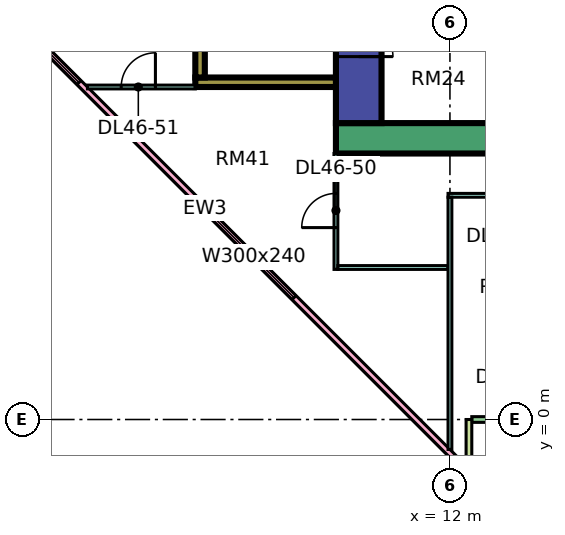
"""IFC4 building model, lengths in metres.
Left out: names, types, materials, properties, quantities, classifications, styles, units other than length and angle.
Written with IfcOpenShell. Run it as: python <this file> out.ifc"""

import sys

from ifc_helpers import new_model, si_unit, direction, frame, frame_2d, origin, place, context, subcontext, project, spatial, rectangle, extrude, element, fill, save


model = new_model("IFC4")
c1 = context("Model", 3, precision=1e-05, world=origin(), true_north=direction((0.0, 1.0)))
c2 = subcontext(c1, "Body", "Model", "MODEL_VIEW")
j1 = project(units=[si_unit("LENGTHUNIT", "METRE"), si_unit("PLANEANGLEUNIT", "RADIAN")], contexts=[c1])
p1 = place(None, origin())
s1 = spatial("IfcSite", under=j1, at=p1, CompositionType="ELEMENT")
p2 = place(p1, origin())
s2 = spatial("IfcBuilding", under=s1, at=p2, CompositionType="ELEMENT")
p3 = place(p2, frame((0.0, 0.0, 198.65)))
s3 = spatial("IfcBuildingStorey", under=s2, at=p3, CompositionType="ELEMENT", Elevation=198.65)
p4 = place(p3, frame((9.0, 7.4, 0.0), z_axis=(0.0, 0.0, 1.0), x_axis=(1.0, 0.0, 0.0)))
e1 = element("IfcWall", 1, at=p4, inside=s3, PredefinedType="SHEAR", context=c2, shape_type="SweptSolid", body=[
    extrude(rectangle(XDim=25.0, YDim=0.8, at=frame_2d((12.5, 0.0))), origin(), (0.0, 0.0, 1.0), 3.75),
])
p5 = place(p3, frame((9.6, 7.8, 0.0), z_axis=(0.0, 0.0, 1.0), x_axis=(0.0, 1.0, 0.0)))
e2 = element("IfcWall", 2, at=p5, inside=s3, PredefinedType="SHEAR", context=c2, shape_type="SweptSolid", body=[
    extrude(rectangle(XDim=11.4, YDim=1.2, at=frame_2d((5.7, 0.0))), origin(), (0.0, 0.0, 1.0), 3.75),
])
p6 = place(p5, frame((4.075, 0.0, 0.0)))
e3 = element("IfcOpeningElement", 3, at=p6, cuts=e2, PredefinedType="OPENING", context=c2, shape_type="SweptSolid", body=[
    extrude(rectangle(XDim=1.1, YDim=2.2, at=frame_2d((0.55, 1.1))), frame((0.0, 0.61, 0.0), z_axis=(0.0, -1.0, 0.0), x_axis=(1.0, 0.0, 0.0)), (0.0, 0.0, 1.0), 1.22),
])
p7 = place(p5, frame((6.575, 0.0, 0.0)))
e4 = element("IfcOpeningElement", 4, at=p7, cuts=e2, PredefinedType="OPENING", context=c2, shape_type="SweptSolid", body=[
    extrude(rectangle(XDim=1.1, YDim=2.2, at=frame_2d((0.55, 1.1))), frame((0.0, 0.61, 0.0), z_axis=(0.0, -1.0, 0.0), x_axis=(1.0, 0.0, 0.0)), (0.0, 0.0, 1.0), 1.22),
])
p8 = place(p5, frame((9.4, 0.0, 0.0)))
e5 = element("IfcOpeningElement", 5, at=p8, cuts=e2, PredefinedType="OPENING", context=c2, shape_type="SweptSolid", body=[
    extrude(rectangle(XDim=1.1, YDim=2.2, at=frame_2d((0.55, 1.1))), frame((0.0, 0.61, 0.0), z_axis=(0.0, -1.0, 0.0), x_axis=(1.0, 0.0, 0.0)), (0.0, 0.0, 1.0), 1.22),
])
p9 = place(p5, frame((1.75, 0.0, 0.0)))
e6 = element("IfcOpeningElement", 6, at=p9, cuts=e2, PredefinedType="OPENING", context=c2, shape_type="SweptSolid", body=[
    extrude(rectangle(XDim=0.9, YDim=2.1, at=frame_2d((0.45, 1.05))), frame((0.0, 0.61, 0.0), z_axis=(0.0, -1.0, 0.0), x_axis=(1.0, 0.0, 0.0)), (0.0, 0.0, 1.0), 1.22),
])
p10 = place(p3, frame((5.3, 8.875, 0.0), z_axis=(0.0, 0.0, 1.0), x_axis=(1.0, 0.0, 0.0)))
e7 = element("IfcWall", 7, at=p10, inside=s3, PredefinedType="SHEAR", context=c2, shape_type="SweptSolid", body=[
    extrude(rectangle(XDim=3.7, YDim=0.25, at=frame_2d((1.85, 0.0))), origin(), (0.0, 0.0, 1.0), 3.75),
])
p11 = place(p3, frame((5.425, 9.0, 0.0), z_axis=(0.0, 0.0, 1.0), x_axis=(0.0, 1.0, 0.0)))
e8 = element("IfcWall", 8, at=p11, inside=s3, PredefinedType="SHEAR", context=c2, shape_type="SweptSolid", body=[
    extrude(rectangle(XDim=4.0, YDim=0.25, at=frame_2d((2.0, 0.0))), origin(), (0.0, 0.0, 1.0), 3.75),
])
p12 = place(p3, frame((-1.447, 12.553, 0.0), z_axis=(0.0, 0.0, 1.0), x_axis=(0.707106781187, -0.707106781187, 0.0)))
e9 = element("IfcWall", 9, at=p12, inside=s3, PredefinedType="SOLIDWALL", context=c2, shape_type="SweptSolid", body=[
    extrude(rectangle(XDim=19.799, YDim=0.15, at=frame_2d((9.899, 0.0))), origin(), (0.0, 0.0, 1.0), 3.35),
])
p13 = place(p12, frame((2.212, 0.0, 0.45)))
e10 = element("IfcOpeningElement", 10, at=p13, cuts=e9, PredefinedType="OPENING", context=c2, shape_type="SweptSolid", body=[
    extrude(rectangle(XDim=3.0, YDim=2.4, at=frame_2d((1.5, 1.2))), frame((0.0, 0.085, 0.0), z_axis=(0.0, -1.0, 0.0), x_axis=(1.0, 0.0, 0.0)), (0.0, 0.0, 1.0), 0.17),
])
p14 = place(p12, frame((10.216, 0.0, 0.45)))
e11 = element("IfcOpeningElement", 11, at=p14, cuts=e9, PredefinedType="OPENING", context=c2, shape_type="SweptSolid", body=[
    extrude(rectangle(XDim=3.0, YDim=2.4, at=frame_2d((1.5, 1.2))), frame((0.0, 0.085, 0.0), z_axis=(0.0, -1.0, 0.0), x_axis=(1.0, 0.0, 0.0)), (0.0, 0.0, 1.0), 0.17),
])
p15 = place(p3, frame((12.575, 0.0, 0.0), z_axis=(0.0, 0.0, 1.0), x_axis=(1.0, 0.0, 0.0)))
e12 = element("IfcWall", 12, at=p15, inside=s3, PredefinedType="SOLIDWALL", context=c2, shape_type="SweptSolid", body=[
    extrude(rectangle(XDim=11.35, YDim=0.15, at=frame_2d((5.675, 0.0))), origin(), (0.0, 0.0, 1.0), 3.35),
])
p16 = place(p15, frame((0.613, 0.0, 0.0)))
e13 = element("IfcOpeningElement", 13, at=p16, cuts=e12, PredefinedType="OPENING", context=c2, shape_type="SweptSolid", body=[
    extrude(rectangle(XDim=1.2, YDim=2.4, at=frame_2d((0.6, 1.2))), frame((0.0, 0.085, 0.0), z_axis=(0.0, -1.0, 0.0), x_axis=(1.0, 0.0, 0.0)), (0.0, 0.0, 1.0), 0.17),
])
p17 = place(p15, frame((5.15, 0.0, 0.45)))
e14 = element("IfcOpeningElement", 14, at=p17, cuts=e12, PredefinedType="OPENING", context=c2, shape_type="SweptSolid", body=[
    extrude(rectangle(XDim=3.0, YDim=2.4, at=frame_2d((1.5, 1.2))), frame((0.0, 0.085, 0.0), z_axis=(0.0, -1.0, 0.0), x_axis=(1.0, 0.0, 0.0)), (0.0, 0.0, 1.0), 0.17),
])
p18 = place(p3, frame((12.5, -1.5, 0.0), z_axis=(0.0, 0.0, 1.0), x_axis=(0.0, 1.0, 0.0)))
e15 = element("IfcWall", 15, at=p18, inside=s3, PredefinedType="SOLIDWALL", context=c2, shape_type="SweptSolid", body=[
    extrude(rectangle(XDim=1.5, YDim=0.15, at=frame_2d((0.75, 0.0))), origin(), (0.0, 0.0, 1.0), 3.35),
])
p19 = place(p3, frame((2.461, 8.75, 0.0), z_axis=(0.0, 0.0, 1.0), x_axis=(1.0, 0.0, 0.0)))
e16 = element("IfcWall", 16, at=p19, inside=s3, PredefinedType="PARTITIONING", context=c2, shape_type="SweptSolid", body=[
    extrude(rectangle(XDim=2.839, YDim=0.1, at=frame_2d((1.419, 0.0))), origin(), (0.0, 0.0, 1.0), 3.35),
])
p20 = place(p19, frame((0.889, 0.0, 0.0)))
e17 = element("IfcOpeningElement", 17, at=p20, cuts=e16, PredefinedType="OPENING", context=c2, shape_type="SweptSolid", body=[
    extrude(rectangle(XDim=0.9, YDim=2.1, at=frame_2d((0.45, 1.05))), frame((0.0, 0.06, 0.0), z_axis=(0.0, -1.0, 0.0), x_axis=(1.0, 0.0, 0.0)), (0.0, 0.0, 1.0), 0.12),
])
p21 = place(p3, frame((9.0, 3.95, 0.0), z_axis=(0.0, 0.0, 1.0), x_axis=(0.0, 1.0, 0.0)))
e18 = element("IfcWall", 18, at=p21, inside=s3, PredefinedType="PARTITIONING", context=c2, shape_type="SweptSolid", body=[
    extrude(rectangle(XDim=3.05, YDim=0.1, at=frame_2d((1.525, 0.0))), origin(), (0.0, 0.0, 1.0), 3.35),
])
p22 = place(p21, frame((1.1, 0.0, 0.0)))
e19 = element("IfcOpeningElement", 19, at=p22, cuts=e18, PredefinedType="OPENING", context=c2, shape_type="SweptSolid", body=[
    extrude(rectangle(XDim=0.9, YDim=2.1, at=frame_2d((0.45, 1.05))), frame((0.0, 0.06, 0.0), z_axis=(0.0, -1.0, 0.0), x_axis=(1.0, 0.0, 0.0)), (0.0, 0.0, 1.0), 0.12),
])
p23 = place(p3, frame((9.05, 4.0, 0.0), z_axis=(0.0, 0.0, 1.0), x_axis=(1.0, 0.0, 0.0)))
e20 = element("IfcWall", 20, at=p23, inside=s3, PredefinedType="PARTITIONING", context=c2, shape_type="SweptSolid", body=[
    extrude(rectangle(XDim=2.9, YDim=0.1, at=frame_2d((1.45, 0.0))), origin(), (0.0, 0.0, 1.0), 3.35),
])
p24 = place(p3, frame((11.95, 5.9, 0.0), z_axis=(0.0, 0.0, 1.0), x_axis=(1.0, 0.0, 0.0)))
e21 = element("IfcWall", 21, at=p24, inside=s3, PredefinedType="PARTITIONING", context=c2, shape_type="SweptSolid", body=[
    extrude(rectangle(XDim=21.1, YDim=0.1, at=frame_2d((10.55, 0.0))), origin(), (0.0, 0.0, 1.0), 3.35),
])
p25 = place(p24, frame((1.1, 0.0, 0.0)))
e22 = element("IfcOpeningElement", 22, at=p25, cuts=e21, PredefinedType="OPENING", context=c2, shape_type="SweptSolid", body=[
    extrude(rectangle(XDim=0.9, YDim=2.1, at=frame_2d((0.45, 1.05))), frame((0.0, 0.06, 0.0), z_axis=(0.0, -1.0, 0.0), x_axis=(1.0, 0.0, 0.0)), (0.0, 0.0, 1.0), 0.12),
])
p26 = place(p24, frame((13.1, 0.0, 0.0)))
e23 = element("IfcOpeningElement", 23, at=p26, cuts=e21, PredefinedType="OPENING", context=c2, shape_type="SweptSolid", body=[
    extrude(rectangle(XDim=0.9, YDim=2.1, at=frame_2d((0.45, 1.05))), frame((0.0, 0.06, 0.0), z_axis=(0.0, -1.0, 0.0), x_axis=(1.0, 0.0, 0.0)), (0.0, 0.0, 1.0), 0.12),
])
p27 = place(p24, frame((16.1, 0.0, 0.0)))
e24 = element("IfcOpeningElement", 24, at=p27, cuts=e21, PredefinedType="OPENING", context=c2, shape_type="SweptSolid", body=[
    extrude(rectangle(XDim=0.9, YDim=2.1, at=frame_2d((0.45, 1.05))), frame((0.0, 0.06, 0.0), z_axis=(0.0, -1.0, 0.0), x_axis=(1.0, 0.0, 0.0)), (0.0, 0.0, 1.0), 0.12),
])
p28 = place(p24, frame((7.1, 0.0, 0.0)))
e25 = element("IfcOpeningElement", 25, at=p28, cuts=e21, PredefinedType="OPENING", context=c2, shape_type="SweptSolid", body=[
    extrude(rectangle(XDim=0.9, YDim=2.1, at=frame_2d((0.45, 1.05))), frame((0.0, 0.06, 0.0), z_axis=(0.0, -1.0, 0.0), x_axis=(1.0, 0.0, 0.0)), (0.0, 0.0, 1.0), 0.12),
])
p29 = place(p3, frame((12.0, -0.788, 0.0), z_axis=(0.0, 0.0, 1.0), x_axis=(0.0, 1.0, 0.0)))
e26 = element("IfcWall", 26, at=p29, inside=s3, PredefinedType="PARTITIONING", context=c2, shape_type="SweptSolid", body=[
    extrude(rectangle(XDim=6.638, YDim=0.1, at=frame_2d((3.319, 0.0))), origin(), (0.0, 0.0, 1.0), 3.35),
])
p30 = place(p13, origin())
e27 = element("IfcWindow", 27, at=p30, inside=s3, PartitioningType="SINGLE_PANEL", PredefinedType="WINDOW", context=c2, shape_type="SweptSolid", body=[
    extrude(rectangle(XDim=3.0, YDim=2.4, at=frame_2d((1.5, 1.2))), frame((0.0, 0.03, 0.0), z_axis=(0.0, -1.0, 0.0), x_axis=(1.0, 0.0, 0.0)), (0.0, 0.0, 1.0), 0.06),
])
fill(e10, e27)
p31 = place(p14, origin())
e28 = element("IfcWindow", 28, at=p31, inside=s3, PartitioningType="SINGLE_PANEL", PredefinedType="WINDOW", context=c2, shape_type="SweptSolid", body=[
    extrude(rectangle(XDim=3.0, YDim=2.4, at=frame_2d((1.5, 1.2))), frame((0.0, 0.03, 0.0), z_axis=(0.0, -1.0, 0.0), x_axis=(1.0, 0.0, 0.0)), (0.0, 0.0, 1.0), 0.06),
])
fill(e11, e28)
p32 = place(p9, frame((0.9, 0.0, 0.0), z_axis=(0.0, 0.0, 1.0), x_axis=(-1.0, 0.0, 0.0)))
e29 = element("IfcDoor", 29, at=p32, inside=s3, OperationType="SINGLE_SWING_LEFT", PredefinedType="DOOR", context=c2, shape_type="SweptSolid", body=[
    extrude(rectangle(XDim=0.9, YDim=2.1, at=frame_2d((0.45, 1.05))), frame((0.0, 0.025, 0.0), z_axis=(0.0, -1.0, 0.0), x_axis=(1.0, 0.0, 0.0)), (0.0, 0.0, 1.0), 0.05),
])
fill(e6, e29)
p33 = place(p22, origin())
e30 = element("IfcDoor", 30, at=p33, inside=s3, OperationType="SINGLE_SWING_LEFT", PredefinedType="DOOR", context=c2, shape_type="SweptSolid", body=[
    extrude(rectangle(XDim=0.9, YDim=2.1, at=frame_2d((0.45, 1.05))), frame((0.0, 0.025, 0.0), z_axis=(0.0, -1.0, 0.0), x_axis=(1.0, 0.0, 0.0)), (0.0, 0.0, 1.0), 0.05),
])
fill(e19, e30)
p34 = place(p20, frame((0.9, 0.0, 0.0), z_axis=(0.0, 0.0, 1.0), x_axis=(-1.0, 0.0, 0.0)))
e31 = element("IfcDoor", 31, at=p34, inside=s3, OperationType="SINGLE_SWING_RIGHT", PredefinedType="DOOR", context=c2, shape_type="SweptSolid", body=[
    extrude(rectangle(XDim=0.9, YDim=2.1, at=frame_2d((0.45, 1.05))), frame((0.0, 0.025, 0.0), z_axis=(0.0, -1.0, 0.0), x_axis=(1.0, 0.0, 0.0)), (0.0, 0.0, 1.0), 0.05),
])
fill(e17, e31)
save(model, sys.argv[1])
